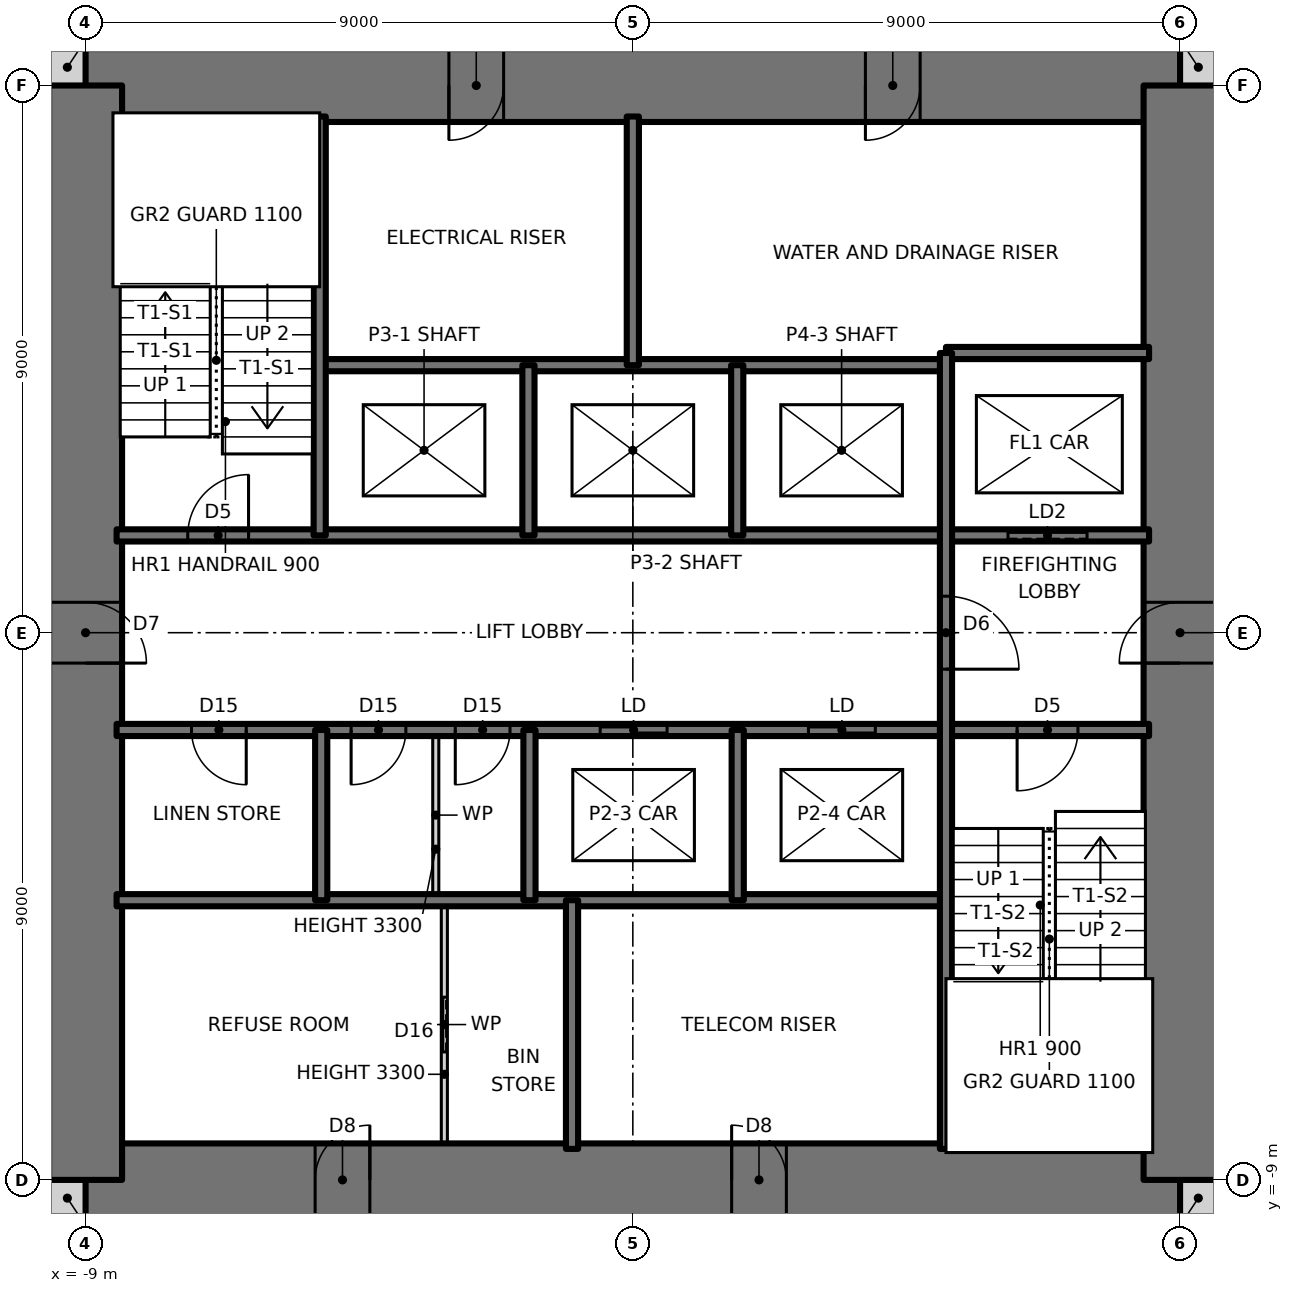
"""IFC4 building model, lengths in metres.
Left out: names, types, materials, properties, quantities, classifications, styles, units other than length and angle.
Written with IfcOpenShell. Run it as: python <this file> out.ifc"""

import sys

from ifc_helpers import new_model, si_unit, direction, frame, frame_2d, origin, place, context, subcontext, project, spatial, rectangle, extrude, element, fill, save


model = new_model("IFC4")
c1 = context("Model", 3, precision=1e-05, world=origin(), true_north=direction((0.0, 1.0)))
c2 = subcontext(c1, "Body", "Model", "MODEL_VIEW")
j1 = project(units=[si_unit("LENGTHUNIT", "METRE"), si_unit("PLANEANGLEUNIT", "RADIAN")], contexts=[c1])
p1 = place(None, origin())
s1 = spatial("IfcSite", under=j1, at=p1, CompositionType="ELEMENT")
p2 = place(p1, origin())
s2 = spatial("IfcBuilding", under=s1, at=p2, CompositionType="ELEMENT")
p3 = place(p2, frame((0.0, 0.0, 94.5)))
s3 = spatial("IfcBuildingStorey", under=s2, at=p3, CompositionType="ELEMENT", Elevation=94.5)
for number, where, z_axis, x_axis in (
    (1, (-9.6, -9.3, 0.0), (0.0, 0.0, 1.0), (1.0, 0.0, 0.0)),
    (2, (9.0, -9.3, 0.0), (0.0, 0.0, 1.0), (1.0, 0.0, 0.0)),
    (3, (9.0, 9.3, 0.0), (0.0, 0.0, 1.0), (1.0, 0.0, 0.0)),
    (4, (-9.6, 9.3, 0.0), (0.0, 0.0, 1.0), (1.0, 0.0, 0.0)),
):
    element("IfcWall", number, at=place(p3, frame(where, z_axis=z_axis, x_axis=x_axis)), inside=s3, PredefinedType="SOLIDWALL", context=c2, shape_type="SweptSolid", body=[
        extrude(rectangle(XDim=0.6, YDim=0.6, at=frame_2d((0.3, 0.0))), origin(), (0.0, 0.0, 1.0), 3.5),
    ])
p4 = place(p3, frame((-9.0, -9.0, 0.0), z_axis=(0.0, 0.0, 1.0), x_axis=(1.0, 0.0, 0.0)))
e5 = element("IfcWall", 5, at=p4, inside=s3, PredefinedType="SHEAR", context=c2, shape_type="SweptSolid", body=[
    extrude(rectangle(XDim=18.0, YDim=1.2, at=frame_2d((9.0, 0.0))), origin(), (0.0, 0.0, 1.0), 3.5),
])
p5 = place(p4, frame((3.775, 0.0, 0.0)))
e6 = element("IfcOpeningElement", 6, at=p5, cuts=e5, PredefinedType="OPENING", context=c2, shape_type="SweptSolid", body=[
    extrude(rectangle(XDim=0.9, YDim=2.1, at=frame_2d((0.45, 1.05))), frame((0.0, 0.61, 0.0), z_axis=(0.0, -1.0, 0.0), x_axis=(1.0, 0.0, 0.0)), (0.0, 0.0, 1.0), 1.22),
])
p6 = place(p4, frame((10.625, 0.0, 0.0)))
e7 = element("IfcOpeningElement", 7, at=p6, cuts=e5, PredefinedType="OPENING", context=c2, shape_type="SweptSolid", body=[
    extrude(rectangle(XDim=0.9, YDim=2.1, at=frame_2d((0.45, 1.05))), frame((0.0, 0.61, 0.0), z_axis=(0.0, -1.0, 0.0), x_axis=(1.0, 0.0, 0.0)), (0.0, 0.0, 1.0), 1.22),
])
p7 = place(p3, frame((9.0, 9.0, 0.0), z_axis=(0.0, 0.0, 1.0), x_axis=(-1.0, 0.0, 0.0)))
e8 = element("IfcWall", 8, at=p7, inside=s3, PredefinedType="SHEAR", context=c2, shape_type="SweptSolid", body=[
    extrude(rectangle(XDim=18.0, YDim=1.2, at=frame_2d((9.0, 0.0))), origin(), (0.0, 0.0, 1.0), 3.5),
])
p8 = place(p7, frame((11.125, 0.0, 0.0)))
e9 = element("IfcOpeningElement", 9, at=p8, cuts=e8, PredefinedType="OPENING", context=c2, shape_type="SweptSolid", body=[
    extrude(rectangle(XDim=0.9, YDim=2.1, at=frame_2d((0.45, 1.05))), frame((0.0, 0.61, 0.0), z_axis=(0.0, -1.0, 0.0), x_axis=(1.0, 0.0, 0.0)), (0.0, 0.0, 1.0), 1.22),
])
p9 = place(p7, frame((4.275, 0.0, 0.0)))
e10 = element("IfcOpeningElement", 10, at=p9, cuts=e8, PredefinedType="OPENING", context=c2, shape_type="SweptSolid", body=[
    extrude(rectangle(XDim=0.9, YDim=2.1, at=frame_2d((0.45, 1.05))), frame((0.0, 0.61, 0.0), z_axis=(0.0, -1.0, 0.0), x_axis=(1.0, 0.0, 0.0)), (0.0, 0.0, 1.0), 1.22),
])
p10 = place(p3, frame((9.0, -9.0, 0.0), z_axis=(0.0, 0.0, 1.0), x_axis=(0.0, 1.0, 0.0)))
e11 = element("IfcWall", 11, at=p10, inside=s3, PredefinedType="SHEAR", context=c2, shape_type="SweptSolid", body=[
    extrude(rectangle(XDim=18.0, YDim=1.2, at=frame_2d((9.0, 0.0))), origin(), (0.0, 0.0, 1.0), 3.5),
])
p11 = place(p10, frame((8.5, 0.0, 0.0)))
e12 = element("IfcOpeningElement", 12, at=p11, cuts=e11, PredefinedType="OPENING", context=c2, shape_type="SweptSolid", body=[
    extrude(rectangle(XDim=1.0, YDim=2.1, at=frame_2d((0.5, 1.05))), frame((0.0, 0.61, 0.0), z_axis=(0.0, -1.0, 0.0), x_axis=(1.0, 0.0, 0.0)), (0.0, 0.0, 1.0), 1.22),
])
p12 = place(p3, frame((-9.0, 9.0, 0.0), z_axis=(0.0, 0.0, 1.0), x_axis=(0.0, -1.0, 0.0)))
e13 = element("IfcWall", 13, at=p12, inside=s3, PredefinedType="SHEAR", context=c2, shape_type="SweptSolid", body=[
    extrude(rectangle(XDim=18.0, YDim=1.2, at=frame_2d((9.0, 0.0))), origin(), (0.0, 0.0, 1.0), 3.5),
])
p13 = place(p12, frame((8.5, 0.0, 0.0)))
e14 = element("IfcOpeningElement", 14, at=p13, cuts=e13, PredefinedType="OPENING", context=c2, shape_type="SweptSolid", body=[
    extrude(rectangle(XDim=1.0, YDim=2.1, at=frame_2d((0.5, 1.05))), frame((0.0, 0.61, 0.0), z_axis=(0.0, -1.0, 0.0), x_axis=(1.0, 0.0, 0.0)), (0.0, 0.0, 1.0), 1.22),
])
p14 = place(p3, frame((-8.49, -4.4, 0.0), z_axis=(0.0, 0.0, 1.0), x_axis=(1.0, 0.0, 0.0)))
e15 = element("IfcWall", 15, at=p14, inside=s3, PredefinedType="SOLIDWALL", context=c2, shape_type="SweptSolid", body=[
    extrude(rectangle(XDim=13.64, YDim=0.2, at=frame_2d((6.82, 0.0))), origin(), (0.0, 0.0, 1.0), 3.5),
])
p15 = place(p3, frame((-8.49, -1.6, 0.0), z_axis=(0.0, 0.0, 1.0), x_axis=(1.0, 0.0, 0.0)))
e16 = element("IfcWall", 16, at=p15, inside=s3, PredefinedType="SOLIDWALL", context=c2, shape_type="SweptSolid", body=[
    extrude(rectangle(XDim=16.98, YDim=0.2, at=frame_2d((8.49, 0.0))), origin(), (0.0, 0.0, 1.0), 3.5),
])
p16 = place(p15, frame((14.81, 0.0, 0.0)))
e17 = element("IfcOpeningElement", 17, at=p16, cuts=e16, PredefinedType="OPENING", context=c2, shape_type="SweptSolid", body=[
    extrude(rectangle(XDim=1.0, YDim=2.1, at=frame_2d((0.5, 1.05))), frame((0.0, 0.11, 0.0), z_axis=(0.0, -1.0, 0.0), x_axis=(1.0, 0.0, 0.0)), (0.0, 0.0, 1.0), 0.22),
])
p17 = place(p15, frame((1.232, 0.0, 0.0)))
e18 = element("IfcOpeningElement", 18, at=p17, cuts=e16, PredefinedType="OPENING", context=c2, shape_type="SweptSolid", body=[
    extrude(rectangle(XDim=0.9, YDim=2.1, at=frame_2d((0.45, 1.05))), frame((0.0, 0.11, 0.0), z_axis=(0.0, -1.0, 0.0), x_axis=(1.0, 0.0, 0.0)), (0.0, 0.0, 1.0), 0.22),
])
p18 = place(p15, frame((5.57, 0.0, 0.0)))
e19 = element("IfcOpeningElement", 19, at=p18, cuts=e16, PredefinedType="OPENING", context=c2, shape_type="SweptSolid", body=[
    extrude(rectangle(XDim=0.9, YDim=2.1, at=frame_2d((0.45, 1.05))), frame((0.0, 0.11, 0.0), z_axis=(0.0, -1.0, 0.0), x_axis=(1.0, 0.0, 0.0)), (0.0, 0.0, 1.0), 0.22),
])
p19 = place(p15, frame((3.857, 0.0, 0.0)))
e20 = element("IfcOpeningElement", 20, at=p19, cuts=e16, PredefinedType="OPENING", context=c2, shape_type="SweptSolid", body=[
    extrude(rectangle(XDim=0.9, YDim=2.1, at=frame_2d((0.45, 1.05))), frame((0.0, 0.11, 0.0), z_axis=(0.0, -1.0, 0.0), x_axis=(1.0, 0.0, 0.0)), (0.0, 0.0, 1.0), 0.22),
])
p20 = place(p15, frame((7.953, 0.0, 0.0)))
e21 = element("IfcOpeningElement", 21, at=p20, cuts=e16, PredefinedType="OPENING", context=c2, shape_type="SweptSolid", body=[
    extrude(rectangle(XDim=1.1, YDim=2.1, at=frame_2d((0.55, 1.05))), frame((0.0, 0.11, 0.0), z_axis=(0.0, -1.0, 0.0), x_axis=(1.0, 0.0, 0.0)), (0.0, 0.0, 1.0), 0.22),
])
p21 = place(p15, frame((11.378, 0.0, 0.0)))
e22 = element("IfcOpeningElement", 22, at=p21, cuts=e16, PredefinedType="OPENING", context=c2, shape_type="SweptSolid", body=[
    extrude(rectangle(XDim=1.1, YDim=2.1, at=frame_2d((0.55, 1.05))), frame((0.0, 0.11, 0.0), z_axis=(0.0, -1.0, 0.0), x_axis=(1.0, 0.0, 0.0)), (0.0, 0.0, 1.0), 0.22),
])
p22 = place(p3, frame((-8.49, 1.6, 0.0), z_axis=(0.0, 0.0, 1.0), x_axis=(1.0, 0.0, 0.0)))
e23 = element("IfcWall", 23, at=p22, inside=s3, PredefinedType="SOLIDWALL", context=c2, shape_type="SweptSolid", body=[
    extrude(rectangle(XDim=16.98, YDim=0.2, at=frame_2d((8.49, 0.0))), origin(), (0.0, 0.0, 1.0), 3.5),
])
p23 = place(p22, frame((1.17, 0.0, 0.0)))
e24 = element("IfcOpeningElement", 24, at=p23, cuts=e23, PredefinedType="OPENING", context=c2, shape_type="SweptSolid", body=[
    extrude(rectangle(XDim=1.0, YDim=2.1, at=frame_2d((0.5, 1.05))), frame((0.0, 0.11, 0.0), z_axis=(0.0, -1.0, 0.0), x_axis=(1.0, 0.0, 0.0)), (0.0, 0.0, 1.0), 0.22),
])
p24 = place(p22, frame((14.66, 0.0, 0.0)))
e25 = element("IfcOpeningElement", 25, at=p24, cuts=e23, PredefinedType="OPENING", context=c2, shape_type="SweptSolid", body=[
    extrude(rectangle(XDim=1.3, YDim=2.1, at=frame_2d((0.65, 1.05))), frame((0.0, 0.11, 0.0), z_axis=(0.0, -1.0, 0.0), x_axis=(1.0, 0.0, 0.0)), (0.0, 0.0, 1.0), 0.22),
])
p25 = place(p3, frame((-5.15, 4.4, 0.0), z_axis=(0.0, 0.0, 1.0), x_axis=(1.0, 0.0, 0.0)))
e26 = element("IfcWall", 26, at=p25, inside=s3, PredefinedType="SOLIDWALL", context=c2, shape_type="SweptSolid", body=[
    extrude(rectangle(XDim=10.3, YDim=0.2, at=frame_2d((5.15, 0.0))), origin(), (0.0, 0.0, 1.0), 3.5),
])
p26 = place(p3, frame((5.15, 4.6, 0.0), z_axis=(0.0, 0.0, 1.0), x_axis=(1.0, 0.0, 0.0)))
e27 = element("IfcWall", 27, at=p26, inside=s3, PredefinedType="SOLIDWALL", context=c2, shape_type="SweptSolid", body=[
    extrude(rectangle(XDim=3.34, YDim=0.2, at=frame_2d((1.67, 0.0))), origin(), (0.0, 0.0, 1.0), 3.5),
])
p27 = place(p3, frame((5.15, -8.49, 0.0), z_axis=(0.0, 0.0, 1.0), x_axis=(0.0, 1.0, 0.0)))
e28 = element("IfcWall", 28, at=p27, inside=s3, PredefinedType="SOLIDWALL", context=c2, shape_type="SweptSolid", body=[
    extrude(rectangle(XDim=13.09, YDim=0.2, at=frame_2d((6.545, 0.0))), origin(), (0.0, 0.0, 1.0), 3.5),
])
p28 = place(p27, frame((7.89, 0.0, 0.0)))
e29 = element("IfcOpeningElement", 29, at=p28, cuts=e28, PredefinedType="OPENING", context=c2, shape_type="SweptSolid", body=[
    extrude(rectangle(XDim=1.2, YDim=2.1, at=frame_2d((0.6, 1.05))), frame((0.0, 0.11, 0.0), z_axis=(0.0, -1.0, 0.0), x_axis=(1.0, 0.0, 0.0)), (0.0, 0.0, 1.0), 0.22),
])
for number, where, z_axis, x_axis in (
    (30, (1.725, -4.4, 0.0), (0.0, 0.0, 1.0), (0.0, 1.0, 0.0)),
    (31, (1.717, 1.6, 0.0), (0.0, 0.0, 1.0), (0.0, 1.0, 0.0)),
):
    element("IfcWall", number, at=place(p3, frame(where, z_axis=z_axis, x_axis=x_axis)), inside=s3, PredefinedType="SOLIDWALL", context=c2, shape_type="SweptSolid", body=[
        extrude(rectangle(XDim=2.8, YDim=0.2, at=frame_2d((1.4, 0.0))), origin(), (0.0, 0.0, 1.0), 3.5),
    ])
for number, where, z_axis, x_axis in (
    (32, (0.0, 4.4, 0.0), (0.0, 0.0, 1.0), (0.0, 1.0, 0.0)),
    (33, (-1.0, -8.49, 0.0), (0.0, 0.0, 1.0), (0.0, 1.0, 0.0)),
):
    element("IfcWall", number, at=place(p3, frame(where, z_axis=z_axis, x_axis=x_axis)), inside=s3, PredefinedType="SOLIDWALL", context=c2, shape_type="SweptSolid", body=[
        extrude(rectangle(XDim=4.09, YDim=0.2, at=frame_2d((2.045, 0.0))), origin(), (0.0, 0.0, 1.0), 3.5),
    ])
for number, where, z_axis, x_axis in (
    (34, (-1.7, -4.4, 0.0), (0.0, 0.0, 1.0), (0.0, 1.0, 0.0)),
    (35, (-1.717, 1.6, 0.0), (0.0, 0.0, 1.0), (0.0, 1.0, 0.0)),
):
    element("IfcWall", number, at=place(p3, frame(where, z_axis=z_axis, x_axis=x_axis)), inside=s3, PredefinedType="SOLIDWALL", context=c2, shape_type="SweptSolid", body=[
        extrude(rectangle(XDim=2.8, YDim=0.2, at=frame_2d((1.4, 0.0))), origin(), (0.0, 0.0, 1.0), 3.5),
    ])
p29 = place(p3, frame((-3.1, -8.49, 0.0), z_axis=(0.0, 0.0, 1.0), x_axis=(0.0, 1.0, 0.0)))
e36 = element("IfcWall", 36, at=p29, inside=s3, PredefinedType="PARTITIONING", context=c2, shape_type="SweptSolid", body=[
    extrude(rectangle(XDim=4.09, YDim=0.1, at=frame_2d((2.045, 0.0))), origin(), (0.0, 0.0, 1.0), 3.3),
])
p30 = place(p29, frame((1.595, 0.0, 0.0)))
e37 = element("IfcOpeningElement", 37, at=p30, cuts=e36, PredefinedType="OPENING", context=c2, shape_type="SweptSolid", body=[
    extrude(rectangle(XDim=0.9, YDim=2.1, at=frame_2d((0.45, 1.05))), frame((0.0, 0.06, 0.0), z_axis=(0.0, -1.0, 0.0), x_axis=(1.0, 0.0, 0.0)), (0.0, 0.0, 1.0), 0.12),
])
p31 = place(p3, frame((-3.241, -4.4, 0.0), z_axis=(0.0, 0.0, 1.0), x_axis=(0.0, 1.0, 0.0)))
e38 = element("IfcWall", 38, at=p31, inside=s3, PredefinedType="PARTITIONING", context=c2, shape_type="SweptSolid", body=[
    extrude(rectangle(XDim=2.8, YDim=0.1, at=frame_2d((1.4, 0.0))), origin(), (0.0, 0.0, 1.0), 3.3),
])
p32 = place(p3, frame((-5.125, -4.4, 0.0), z_axis=(0.0, 0.0, 1.0), x_axis=(0.0, 1.0, 0.0)))
e39 = element("IfcWall", 39, at=p32, inside=s3, PredefinedType="SOLIDWALL", context=c2, shape_type="SweptSolid", body=[
    extrude(rectangle(XDim=2.8, YDim=0.2, at=frame_2d((1.4, 0.0))), origin(), (0.0, 0.0, 1.0), 3.5),
])
p33 = place(p3, frame((-5.15, 1.6, 0.0), z_axis=(0.0, 0.0, 1.0), x_axis=(0.0, 1.0, 0.0)))
e40 = element("IfcWall", 40, at=p33, inside=s3, PredefinedType="SOLIDWALL", context=c2, shape_type="SweptSolid", body=[
    extrude(rectangle(XDim=6.89, YDim=0.2, at=frame_2d((3.445, 0.0))), origin(), (0.0, 0.0, 1.0), 3.5),
])
p34 = place(p23, origin())
e41 = element("IfcDoor", 41, at=p34, inside=s3, OperationType="SINGLE_SWING_RIGHT", PredefinedType="DOOR", context=c2, shape_type="SweptSolid", body=[
    extrude(rectangle(XDim=1.0, YDim=2.1, at=frame_2d((0.5, 1.05))), frame((0.0, 0.025, 0.0), z_axis=(0.0, -1.0, 0.0), x_axis=(1.0, 0.0, 0.0)), (0.0, 0.0, 1.0), 0.05),
])
fill(e24, e41)
p35 = place(p16, frame((1.0, 0.0, 0.0), z_axis=(0.0, 0.0, 1.0), x_axis=(-1.0, 0.0, 0.0)))
e42 = element("IfcDoor", 42, at=p35, inside=s3, OperationType="SINGLE_SWING_RIGHT", PredefinedType="DOOR", context=c2, shape_type="SweptSolid", body=[
    extrude(rectangle(XDim=1.0, YDim=2.1, at=frame_2d((0.5, 1.05))), frame((0.0, 0.025, 0.0), z_axis=(0.0, -1.0, 0.0), x_axis=(1.0, 0.0, 0.0)), (0.0, 0.0, 1.0), 0.05),
])
fill(e17, e42)
p36 = place(p28, frame((1.2, 0.0, 0.0), z_axis=(0.0, 0.0, 1.0), x_axis=(-1.0, 0.0, 0.0)))
e43 = element("IfcDoor", 43, at=p36, inside=s3, OperationType="SINGLE_SWING_RIGHT", PredefinedType="DOOR", context=c2, shape_type="SweptSolid", body=[
    extrude(rectangle(XDim=1.2, YDim=2.1, at=frame_2d((0.6, 1.05))), frame((0.0, 0.025, 0.0), z_axis=(0.0, -1.0, 0.0), x_axis=(1.0, 0.0, 0.0)), (0.0, 0.0, 1.0), 0.05),
])
fill(e29, e43)
p37 = place(p17, frame((0.9, 0.0, 0.0), z_axis=(0.0, 0.0, 1.0), x_axis=(-1.0, 0.0, 0.0)))
e44 = element("IfcDoor", 44, at=p37, inside=s3, OperationType="SINGLE_SWING_LEFT", PredefinedType="DOOR", context=c2, shape_type="SweptSolid", body=[
    extrude(rectangle(XDim=0.9, YDim=2.1, at=frame_2d((0.45, 1.05))), frame((0.0, 0.025, 0.0), z_axis=(0.0, -1.0, 0.0), x_axis=(1.0, 0.0, 0.0)), (0.0, 0.0, 1.0), 0.05),
])
fill(e18, e44)
p38 = place(p18, frame((0.9, 0.0, 0.0), z_axis=(0.0, 0.0, 1.0), x_axis=(-1.0, 0.0, 0.0)))
e45 = element("IfcDoor", 45, at=p38, inside=s3, OperationType="SINGLE_SWING_RIGHT", PredefinedType="DOOR", context=c2, shape_type="SweptSolid", body=[
    extrude(rectangle(XDim=0.9, YDim=2.1, at=frame_2d((0.45, 1.05))), frame((0.0, 0.025, 0.0), z_axis=(0.0, -1.0, 0.0), x_axis=(1.0, 0.0, 0.0)), (0.0, 0.0, 1.0), 0.05),
])
fill(e19, e45)
p39 = place(p19, frame((0.9, 0.0, 0.0), z_axis=(0.0, 0.0, 1.0), x_axis=(-1.0, 0.0, 0.0)))
e46 = element("IfcDoor", 46, at=p39, inside=s3, OperationType="SINGLE_SWING_RIGHT", PredefinedType="DOOR", context=c2, shape_type="SweptSolid", body=[
    extrude(rectangle(XDim=0.9, YDim=2.1, at=frame_2d((0.45, 1.05))), frame((0.0, 0.025, 0.0), z_axis=(0.0, -1.0, 0.0), x_axis=(1.0, 0.0, 0.0)), (0.0, 0.0, 1.0), 0.05),
])
fill(e20, e46)
p40 = place(p30, origin())
e47 = element("IfcDoor", 47, at=p40, inside=s3, OperationType="SLIDING_TO_LEFT", PredefinedType="DOOR", context=c2, shape_type="SweptSolid", body=[
    extrude(rectangle(XDim=0.9, YDim=2.1, at=frame_2d((0.45, 1.05))), frame((0.0, 0.025, 0.0), z_axis=(0.0, -1.0, 0.0), x_axis=(1.0, 0.0, 0.0)), (0.0, 0.0, 1.0), 0.05),
])
fill(e37, e47)
p41 = place(p13, origin())
e48 = element("IfcDoor", 48, at=p41, inside=s3, OperationType="SINGLE_SWING_RIGHT", PredefinedType="DOOR", context=c2, shape_type="SweptSolid", body=[
    extrude(rectangle(XDim=1.0, YDim=2.1, at=frame_2d((0.5, 1.05))), frame((0.0, 0.025, 0.0), z_axis=(0.0, -1.0, 0.0), x_axis=(1.0, 0.0, 0.0)), (0.0, 0.0, 1.0), 0.05),
])
fill(e14, e48)
p42 = place(p11, origin())
e49 = element("IfcDoor", 49, at=p42, inside=s3, OperationType="SINGLE_SWING_LEFT", PredefinedType="DOOR", context=c2, shape_type="SweptSolid", body=[
    extrude(rectangle(XDim=1.0, YDim=2.1, at=frame_2d((0.5, 1.05))), frame((0.0, 0.025, 0.0), z_axis=(0.0, -1.0, 0.0), x_axis=(1.0, 0.0, 0.0)), (0.0, 0.0, 1.0), 0.05),
])
fill(e12, e49)
p43 = place(p8, origin())
e50 = element("IfcDoor", 50, at=p43, inside=s3, OperationType="SINGLE_SWING_RIGHT", PredefinedType="DOOR", context=c2, shape_type="SweptSolid", body=[
    extrude(rectangle(XDim=0.9, YDim=2.1, at=frame_2d((0.45, 1.05))), frame((0.0, 0.025, 0.0), z_axis=(0.0, -1.0, 0.0), x_axis=(1.0, 0.0, 0.0)), (0.0, 0.0, 1.0), 0.05),
])
fill(e9, e50)
p44 = place(p9, origin())
e51 = element("IfcDoor", 51, at=p44, inside=s3, OperationType="SINGLE_SWING_RIGHT", PredefinedType="DOOR", context=c2, shape_type="SweptSolid", body=[
    extrude(rectangle(XDim=0.9, YDim=2.1, at=frame_2d((0.45, 1.05))), frame((0.0, 0.025, 0.0), z_axis=(0.0, -1.0, 0.0), x_axis=(1.0, 0.0, 0.0)), (0.0, 0.0, 1.0), 0.05),
])
fill(e10, e51)
p45 = place(p5, origin())
e52 = element("IfcDoor", 52, at=p45, inside=s3, OperationType="SINGLE_SWING_RIGHT", PredefinedType="DOOR", context=c2, shape_type="SweptSolid", body=[
    extrude(rectangle(XDim=0.9, YDim=2.1, at=frame_2d((0.45, 1.05))), frame((0.0, 0.025, 0.0), z_axis=(0.0, -1.0, 0.0), x_axis=(1.0, 0.0, 0.0)), (0.0, 0.0, 1.0), 0.05),
])
fill(e6, e52)
p46 = place(p6, origin())
e53 = element("IfcDoor", 53, at=p46, inside=s3, OperationType="SINGLE_SWING_LEFT", PredefinedType="DOOR", context=c2, shape_type="SweptSolid", body=[
    extrude(rectangle(XDim=0.9, YDim=2.1, at=frame_2d((0.45, 1.05))), frame((0.0, 0.025, 0.0), z_axis=(0.0, -1.0, 0.0), x_axis=(1.0, 0.0, 0.0)), (0.0, 0.0, 1.0), 0.05),
])
fill(e7, e53)
p47 = place(p20, origin())
e54 = element("IfcDoor", 54, at=p47, inside=s3, OperationType="DOUBLE_DOOR_SLIDING", PredefinedType="DOOR", context=c2, shape_type="SweptSolid", body=[
    extrude(rectangle(XDim=1.1, YDim=2.1, at=frame_2d((0.55, 1.05))), frame((0.0, 0.025, 0.0), z_axis=(0.0, -1.0, 0.0), x_axis=(1.0, 0.0, 0.0)), (0.0, 0.0, 1.0), 0.05),
])
fill(e21, e54)
p48 = place(p21, origin())
e55 = element("IfcDoor", 55, at=p48, inside=s3, OperationType="DOUBLE_DOOR_SLIDING", PredefinedType="DOOR", context=c2, shape_type="SweptSolid", body=[
    extrude(rectangle(XDim=1.1, YDim=2.1, at=frame_2d((0.55, 1.05))), frame((0.0, 0.025, 0.0), z_axis=(0.0, -1.0, 0.0), x_axis=(1.0, 0.0, 0.0)), (0.0, 0.0, 1.0), 0.05),
])
fill(e22, e55)
p49 = place(p24, origin())
e56 = element("IfcDoor", 56, at=p49, inside=s3, OperationType="SLIDING_TO_LEFT", PredefinedType="DOOR", context=c2, shape_type="SweptSolid", body=[
    extrude(rectangle(XDim=1.3, YDim=2.1, at=frame_2d((0.65, 1.05))), frame((0.0, 0.025, 0.0), z_axis=(0.0, -1.0, 0.0), x_axis=(1.0, 0.0, 0.0)), (0.0, 0.0, 1.0), 0.05),
])
fill(e25, e56)
save(model, sys.argv[1])
